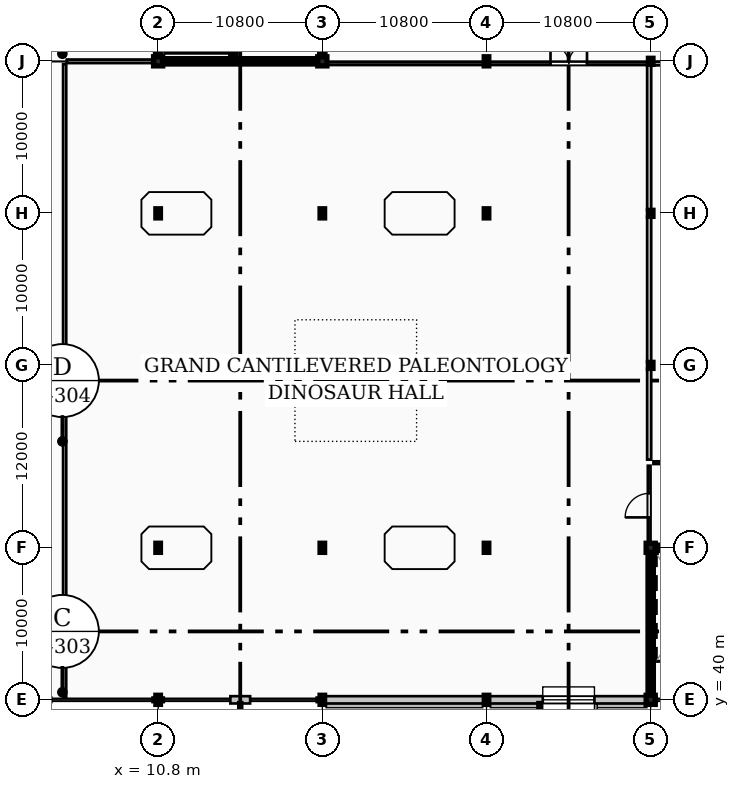
"""IFC4 building model, lengths in metres.
Left out: names, types, materials, properties, quantities, classifications, styles, units other than length and angle.
Written with IfcOpenShell. Run it as: python <this file> out.ifc"""

import sys

from ifc_helpers import new_model, si_unit, direction, frame, frame_2d, origin, origin_2d, place, context, subcontext, project, spatial, rectangle, i_section, extrude, element, fill, save


model = new_model("IFC4")
c1 = context("Model", 3, precision=1e-05, world=origin(), true_north=direction((0.0, 1.0)))
c2 = subcontext(c1, "Body", "Model", "MODEL_VIEW")
j1 = project(units=[si_unit("LENGTHUNIT", "METRE"), si_unit("PLANEANGLEUNIT", "RADIAN")], contexts=[c1])
p1 = place(None, origin())
s1 = spatial("IfcSite", under=j1, at=p1, CompositionType="ELEMENT")
p2 = place(p1, origin())
s2 = spatial("IfcBuilding", under=s1, at=p2, CompositionType="ELEMENT")
p3 = place(p2, frame((0.0, 0.0, 14.4)))
s3 = spatial("IfcBuildingStorey", under=s2, at=p3, CompositionType="ELEMENT", Elevation=14.4)
for number, where, z_axis, x_axis in (
    (1, (10.8, 40.0, 0.0), (0.0, 0.0, 1.0), (1.0, 0.0, 0.0)),
    (2, (10.8, 50.0, 0.0), (0.0, 0.0, 1.0), (1.0, 0.0, 0.0)),
    (3, (10.8, 62.0, 0.0), (0.0, 0.0, 1.0), (1.0, 0.0, 0.0)),
    (4, (10.8, 72.0, 0.0), (0.0, 0.0, 1.0), (1.0, 0.0, 0.0)),
):
    element("IfcColumn", number, at=place(p3, frame(where, z_axis=z_axis, x_axis=x_axis)), inside=s3, PredefinedType="COLUMN", context=c2, shape_type="SweptSolid", body=[
        extrude(i_section(OverallWidth=0.3, OverallDepth=0.6, WebThickness=0.015, FlangeThickness=0.03, FilletRadius=0.027, at=origin_2d()), origin(), (0.0, 0.0, 1.0), 9.6),
    ])
p4 = place(p3, frame((10.8, 82.0, 0.0), z_axis=(0.0, 0.0, 1.0), x_axis=(1.0, 0.0, 0.0)))
e5 = element("IfcColumn", 5, at=p4, inside=s3, PredefinedType="COLUMN", context=c2, shape_type="SweptSolid", body=[
    extrude(rectangle(XDim=0.6, YDim=0.6, at=origin_2d()), origin(), (0.0, 0.0, 1.0), 9.6),
])
for number, where, z_axis, x_axis in (
    (6, (21.6, 40.0, 0.0), (0.0, 0.0, 1.0), (1.0, 0.0, 0.0)),
    (7, (21.6, 50.0, 0.0), (0.0, 0.0, 1.0), (1.0, 0.0, 0.0)),
    (8, (21.6, 62.0, 0.0), (0.0, 0.0, 1.0), (1.0, 0.0, 0.0)),
    (9, (21.6, 72.0, 0.0), (0.0, 0.0, 1.0), (1.0, 0.0, 0.0)),
):
    element("IfcColumn", number, at=place(p3, frame(where, z_axis=z_axis, x_axis=x_axis)), inside=s3, PredefinedType="COLUMN", context=c2, shape_type="SweptSolid", body=[
        extrude(i_section(OverallWidth=0.3, OverallDepth=0.6, WebThickness=0.015, FlangeThickness=0.03, FilletRadius=0.027, at=origin_2d()), origin(), (0.0, 0.0, 1.0), 9.6),
    ])
p5 = place(p3, frame((21.6, 82.0, 0.0), z_axis=(0.0, 0.0, 1.0), x_axis=(1.0, 0.0, 0.0)))
e10 = element("IfcColumn", 10, at=p5, inside=s3, PredefinedType="COLUMN", context=c2, shape_type="SweptSolid", body=[
    extrude(rectangle(XDim=0.6, YDim=0.6, at=origin_2d()), origin(), (0.0, 0.0, 1.0), 9.6),
])
for number, where, z_axis, x_axis in (
    (11, (32.4, 40.0, 0.0), (0.0, 0.0, 1.0), (1.0, 0.0, 0.0)),
    (12, (32.4, 50.0, 0.0), (0.0, 0.0, 1.0), (1.0, 0.0, 0.0)),
    (13, (32.4, 62.0, 0.0), (0.0, 0.0, 1.0), (1.0, 0.0, 0.0)),
    (14, (32.4, 72.0, 0.0), (0.0, 0.0, 1.0), (1.0, 0.0, 0.0)),
    (15, (32.4, 82.0, 0.0), (0.0, 0.0, 1.0), (1.0, 0.0, 0.0)),
):
    element("IfcColumn", number, at=place(p3, frame(where, z_axis=z_axis, x_axis=x_axis)), inside=s3, PredefinedType="COLUMN", context=c2, shape_type="SweptSolid", body=[
        extrude(i_section(OverallWidth=0.3, OverallDepth=0.6, WebThickness=0.015, FlangeThickness=0.03, FilletRadius=0.027, at=origin_2d()), origin(), (0.0, 0.0, 1.0), 9.6),
    ])
for number, where, z_axis, x_axis in (
    (16, (43.2, 40.0, 0.0), (0.0, 0.0, 1.0), (1.0, 0.0, 0.0)),
    (17, (43.2, 50.0, 0.0), (0.0, 0.0, 1.0), (1.0, 0.0, 0.0)),
):
    element("IfcColumn", number, at=place(p3, frame(where, z_axis=z_axis, x_axis=x_axis)), inside=s3, PredefinedType="COLUMN", context=c2, shape_type="SweptSolid", body=[
        extrude(rectangle(XDim=0.6, YDim=0.6, at=origin_2d()), origin(), (0.0, 0.0, 1.0), 9.6),
    ])
for number, where, z_axis, x_axis in (
    (18, (43.2, 62.0, 0.0), (0.0, 0.0, 1.0), (1.0, 0.0, 0.0)),
    (19, (43.2, 72.0, 0.0), (0.0, 0.0, 1.0), (1.0, 0.0, 0.0)),
    (20, (43.2, 82.0, 0.0), (0.0, 0.0, 1.0), (1.0, 0.0, 0.0)),
):
    element("IfcColumn", number, at=place(p3, frame(where, z_axis=z_axis, x_axis=x_axis)), inside=s3, PredefinedType="COLUMN", context=c2, shape_type="SweptSolid", body=[
        extrude(i_section(OverallWidth=0.3, OverallDepth=0.4, WebThickness=0.013, FlangeThickness=0.024, FilletRadius=0.027, at=origin_2d()), origin(), (0.0, 0.0, 1.0), 9.6),
    ])
p6 = place(p3, frame((10.43, 40.0, 0.0), z_axis=(0.0, 0.0, 1.0), x_axis=(1.0, 0.0, 0.0)))
e21 = element("IfcWall", 21, at=p6, inside=s3, PredefinedType="STANDARD", context=c2, shape_type="SweptSolid", body=[
    extrude(rectangle(XDim=0.225, YDim=0.3, at=frame_2d((0.113, 0.0))), origin(), (0.0, 0.0, 1.0), 9.36),
])
p7 = place(p3, frame((15.55, 40.0, 0.0), z_axis=(0.0, 0.0, 1.0), x_axis=(1.0, 0.0, 0.0)))
e22 = element("IfcWall", 22, at=p7, inside=s3, PredefinedType="STANDARD", context=c2, shape_type="SweptSolid", body=[
    extrude(rectangle(XDim=1.3, YDim=0.48, at=frame_2d((0.65, 0.0))), origin(), (0.0, 0.0, 1.0), 8.759),
])
p8 = place(p3, frame((10.945, 40.0, 0.0), z_axis=(0.0, 0.0, 1.0), x_axis=(1.0, 0.0, 0.0)))
e23 = element("IfcWall", 23, at=p8, inside=s3, PredefinedType="STANDARD", context=c2, shape_type="SweptSolid", body=[
    extrude(rectangle(XDim=0.225, YDim=0.3, at=frame_2d((0.112, 0.0))), origin(), (0.0, 0.0, 1.0), 9.36),
])
p9 = place(p3, frame((21.23, 40.0, 0.0), z_axis=(0.0, 0.0, 1.0), x_axis=(1.0, 0.0, 0.0)))
e24 = element("IfcWall", 24, at=p9, inside=s3, PredefinedType="STANDARD", context=c2, shape_type="SweptSolid", body=[
    extrude(rectangle(XDim=0.225, YDim=0.3, at=frame_2d((0.113, 0.0))), origin(), (0.0, 0.0, 1.0), 9.36),
])
p10 = place(p3, frame((21.745, 40.0, 0.0), z_axis=(0.0, 0.0, 1.0), x_axis=(1.0, 0.0, 0.0)))
e25 = element("IfcWall", 25, at=p10, inside=s3, PredefinedType="STANDARD", context=c2, shape_type="SweptSolid", body=[
    extrude(rectangle(XDim=10.51, YDim=0.48, at=frame_2d((5.255, 0.0))), origin(), (0.0, 0.0, 1.0), 8.759),
])
p11 = place(p3, frame((32.545, 40.0, 0.0), z_axis=(0.0, 0.0, 1.0), x_axis=(1.0, 0.0, 0.0)))
e26 = element("IfcWall", 26, at=p11, inside=s3, PredefinedType="STANDARD", context=c2, shape_type="SweptSolid", body=[
    extrude(rectangle(XDim=10.51, YDim=0.48, at=frame_2d((5.255, 0.0))), origin(), (0.0, 0.0, 1.0), 9.36),
])
p12 = place(p11, frame((3.555, 0.0, 1.1)))
e27 = element("IfcOpeningElement", 27, at=p12, cuts=e26, PredefinedType="OPENING", context=c2, shape_type="SweptSolid", body=[
    extrude(rectangle(XDim=3.4, YDim=5.8, at=frame_2d((1.7, 2.9))), frame((0.0, 0.25, 0.0), z_axis=(0.0, -1.0, 0.0), x_axis=(1.0, 0.0, 0.0)), (0.0, 0.0, 1.0), 0.5),
])
p13 = place(p3, frame((43.345, 40.0, 0.0), z_axis=(0.0, 0.0, 1.0), x_axis=(1.0, 0.0, 0.0)))
e28 = element("IfcWall", 28, at=p13, inside=s3, PredefinedType="STANDARD", context=c2, shape_type="SweptSolid", body=[
    extrude(rectangle(XDim=0.225, YDim=0.3, at=frame_2d((0.113, 0.0))), origin(), (0.0, 0.0, 1.0), 9.36),
])
p14 = place(p3, frame((11.1, 82.0, 0.0), z_axis=(0.0, 0.0, 1.0), x_axis=(1.0, 0.0, 0.0)))
e29 = element("IfcWall", 29, at=p14, inside=s3, PredefinedType="SHEAR", context=c2, shape_type="SweptSolid", body=[
    extrude(rectangle(XDim=10.2, YDim=0.35, at=frame_2d((5.1, 0.0))), origin(), (0.0, 0.0, 1.0), 9.36),
])
p15 = place(p3, frame((10.8, 82.3, 0.0), z_axis=(0.0, 0.0, 1.0), x_axis=(0.0, 1.0, 0.0)))
e30 = element("IfcWall", 30, at=p15, inside=s3, PredefinedType="SHEAR", context=c2, shape_type="SweptSolid", body=[
    extrude(rectangle(XDim=9.4, YDim=0.35, at=frame_2d((4.7, 0.0))), origin(), (0.0, 0.0, 1.0), 9.36),
])
p16 = place(p3, frame((21.6, 82.3, 0.0), z_axis=(0.0, 0.0, 1.0), x_axis=(0.0, 1.0, 0.0)))
e31 = element("IfcWall", 31, at=p16, inside=s3, PredefinedType="SHEAR", context=c2, shape_type="SweptSolid", body=[
    extrude(rectangle(XDim=9.4, YDim=0.35, at=frame_2d((4.7, 0.0))), origin(), (0.0, 0.0, 1.0), 9.36),
])
p17 = place(p16, frame((0.88, 0.0, 0.0)))
e32 = element("IfcOpeningElement", 32, at=p17, cuts=e31, PredefinedType="OPENING", context=c2, shape_type="SweptSolid", body=[
    extrude(rectangle(XDim=1.8, YDim=2.25, at=frame_2d((0.9, 1.125))), frame((0.0, 0.185, 0.0), z_axis=(0.0, -1.0, 0.0), x_axis=(1.0, 0.0, 0.0)), (0.0, 0.0, 1.0), 0.37),
])
p18 = place(p3, frame((15.75, 82.175, 0.0), z_axis=(0.0, 0.0, 1.0), x_axis=(0.0, 1.0, 0.0)))
e33 = element("IfcWall", 33, at=p18, inside=s3, PredefinedType="SHEAR", context=c2, shape_type="SweptSolid", body=[
    extrude(rectangle(XDim=9.65, YDim=0.35, at=frame_2d((4.825, 0.0))), origin(), (0.0, 0.0, 1.0), 9.36),
])
p19 = place(p18, frame((0.9, 0.0, 0.0)))
e34 = element("IfcOpeningElement", 34, at=p19, cuts=e33, PredefinedType="OPENING", context=c2, shape_type="SweptSolid", body=[
    extrude(rectangle(XDim=1.1, YDim=2.2, at=frame_2d((0.55, 1.1))), frame((0.0, 0.185, 0.0), z_axis=(0.0, -1.0, 0.0), x_axis=(1.0, 0.0, 0.0)), (0.0, 0.0, 1.0), 0.37),
])
p20 = place(p3, frame((43.5, 50.0, 0.0), z_axis=(0.0, 0.0, 1.0), x_axis=(1.0, 0.0, 0.0)))
e35 = element("IfcWall", 35, at=p20, inside=s3, PredefinedType="SHEAR", context=c2, shape_type="SweptSolid", body=[
    extrude(rectangle(XDim=10.2, YDim=0.35, at=frame_2d((5.1, 0.0))), origin(), (0.0, 0.0, 1.0), 9.36),
])
p21 = place(p3, frame((43.2, 40.3, 0.0), z_axis=(0.0, 0.0, 1.0), x_axis=(0.0, 1.0, 0.0)))
e36 = element("IfcWall", 36, at=p21, inside=s3, PredefinedType="SHEAR", context=c2, shape_type="SweptSolid", body=[
    extrude(rectangle(XDim=9.4, YDim=0.35, at=frame_2d((4.7, 0.0))), origin(), (0.0, 0.0, 1.0), 9.36),
])
p22 = place(p3, frame((21.78, 81.85, 0.0), z_axis=(0.0, 0.0, 1.0), x_axis=(1.0, 0.0, 0.0)))
e37 = element("IfcWall", 37, at=p22, inside=s3, PredefinedType="PARTITIONING", context=c2, shape_type="SweptSolid", body=[
    extrude(rectangle(XDim=10.42, YDim=0.19, at=frame_2d((5.21, 0.0))), origin(), (0.0, 0.0, 1.0), 8.759),
])
p23 = place(p3, frame((32.6, 81.85, 0.0), z_axis=(0.0, 0.0, 1.0), x_axis=(1.0, 0.0, 0.0)))
e38 = element("IfcWall", 38, at=p23, inside=s3, PredefinedType="PARTITIONING", context=c2, shape_type="SweptSolid", body=[
    extrude(rectangle(XDim=10.42, YDim=0.19, at=frame_2d((5.21, 0.0))), origin(), (0.0, 0.0, 1.0), 8.96),
])
p24 = place(p23, frame((4.01, 0.0, 0.0)))
e39 = element("IfcOpeningElement", 39, at=p24, cuts=e38, PredefinedType="OPENING", context=c2, shape_type="SweptSolid", body=[
    extrude(rectangle(XDim=2.4, YDim=2.8, at=frame_2d((1.2, 1.4))), frame((0.0, 0.105, 0.0), z_axis=(0.0, -1.0, 0.0), x_axis=(1.0, 0.0, 0.0)), (0.0, 0.0, 1.0), 0.21),
])
p25 = place(p3, frame((43.38, 81.85, 0.0), z_axis=(0.0, 0.0, 1.0), x_axis=(1.0, 0.0, 0.0)))
e40 = element("IfcWall", 40, at=p25, inside=s3, PredefinedType="PARTITIONING", context=c2, shape_type="SweptSolid", body=[
    extrude(rectangle(XDim=10.44, YDim=0.23, at=frame_2d((5.22, 0.0))), origin(), (0.0, 0.0, 1.0), 8.96),
])
p26 = place(p25, frame((3.92, 0.0, 0.0)))
e41 = element("IfcOpeningElement", 41, at=p26, cuts=e40, PredefinedType="OPENING", context=c2, shape_type="SweptSolid", body=[
    extrude(rectangle(XDim=2.6, YDim=2.8, at=frame_2d((1.3, 1.4))), frame((0.0, 0.125, 0.0), z_axis=(0.0, -1.0, 0.0), x_axis=(1.0, 0.0, 0.0)), (0.0, 0.0, 1.0), 0.25),
])
p27 = place(p3, frame((43.1, 50.18, 0.0), z_axis=(0.0, 0.0, 1.0), x_axis=(0.0, 1.0, 0.0)))
e42 = element("IfcWall", 42, at=p27, inside=s3, PredefinedType="PLUMBINGWALL", context=c2, shape_type="SweptSolid", body=[
    extrude(rectangle(XDim=5.22, YDim=0.18, at=frame_2d((2.61, 0.0))), origin(), (0.0, 0.0, 1.0), 9.32),
])
p28 = place(p27, frame((1.82, 0.0, 0.0)))
e43 = element("IfcOpeningElement", 43, at=p28, cuts=e42, PredefinedType="OPENING", context=c2, shape_type="SweptSolid", body=[
    extrude(rectangle(XDim=1.58, YDim=2.48, at=frame_2d((0.79, 1.24))), frame((0.0, 0.1, 0.0), z_axis=(0.0, -1.0, 0.0), x_axis=(1.0, 0.0, 0.0)), (0.0, 0.0, 1.0), 0.2),
])
p29 = place(p3, frame((43.38, 55.6, 0.0), z_axis=(0.0, 0.0, 1.0), x_axis=(1.0, 0.0, 0.0)))
e44 = element("IfcWall", 44, at=p29, inside=s3, PredefinedType="PLUMBINGWALL", context=c2, shape_type="SweptSolid", body=[
    extrude(rectangle(XDim=4.82, YDim=0.18, at=frame_2d((2.41, 0.0))), origin(), (0.0, 0.0, 1.0), 9.32),
])
p30 = place(p3, frame((4.8, 82.0, 0.0), z_axis=(0.0, 0.0, 1.0), x_axis=(1.0, 0.0, 0.0)))
e45 = element("IfcWall", 45, at=p30, inside=s3, PredefinedType="PARTITIONING", context=c2, shape_type="SweptSolid", body=[
    extrude(rectangle(XDim=5.82, YDim=0.21, at=frame_2d((2.91, 0.0))), origin(), (0.0, 0.0, 1.0), 4.054),
])
p31 = place(p3, frame((43.1, 55.8, 0.0), z_axis=(0.0, 0.0, 1.0), x_axis=(0.0, 1.0, 0.0)))
e46 = element("IfcWall", 46, at=p31, inside=s3, PredefinedType="PARTITIONING", context=c2, shape_type="SweptSolid", body=[
    extrude(rectangle(XDim=6.0, YDim=0.27, at=frame_2d((3.0, 0.0))), origin(), (0.0, 0.0, 1.0), 9.32),
])
p32 = place(p3, frame((43.1, 62.2, 0.0), z_axis=(0.0, 0.0, 1.0), x_axis=(0.0, 1.0, 0.0)))
e47 = element("IfcWall", 47, at=p32, inside=s3, PredefinedType="PARTITIONING", context=c2, shape_type="SweptSolid", body=[
    extrude(rectangle(XDim=9.6, YDim=0.27, at=frame_2d((4.8, 0.0))), origin(), (0.0, 0.0, 1.0), 9.32),
])
p33 = place(p3, frame((43.1, 72.2, 0.0), z_axis=(0.0, 0.0, 1.0), x_axis=(0.0, 1.0, 0.0)))
e48 = element("IfcWall", 48, at=p33, inside=s3, PredefinedType="PARTITIONING", context=c2, shape_type="SweptSolid", body=[
    extrude(rectangle(XDim=9.62, YDim=0.27, at=frame_2d((4.81, 0.0))), origin(), (0.0, 0.0, 1.0), 9.32),
])
p34 = place(p3, frame((4.65, 40.18, 0.0), z_axis=(0.0, 0.0, 1.0), x_axis=(0.0, 1.0, 0.0)))
e49 = element("IfcWall", 49, at=p34, inside=s3, PredefinedType="PARTITIONING", context=c2, shape_type="SweptSolid", body=[
    extrude(rectangle(XDim=41.64, YDim=0.21, at=frame_2d((20.82, 0.0))), origin(), (0.0, 0.0, 1.0), 9.32),
])
p35 = place(p3, frame((4.8, 82.0, 4.445), z_axis=(0.0, 0.0, 1.0), x_axis=(1.0, 0.0, 0.0)))
e50 = element("IfcWall", 50, at=p35, inside=s3, PredefinedType="PARTITIONING", context=c2, shape_type="SweptSolid", body=[
    extrude(rectangle(XDim=5.82, YDim=0.21, at=frame_2d((2.91, 0.0))), origin(), (0.0, 0.0, 1.0), 4.314),
])
p36 = place(p12, origin())
e51 = element("IfcWindow", 51, at=p36, inside=s3, PartitioningType="SINGLE_PANEL", PredefinedType="WINDOW", context=c2, shape_type="SweptSolid", body=[
    extrude(rectangle(XDim=3.4, YDim=5.8, at=frame_2d((1.7, 2.9))), frame((0.0, 0.03, 0.0), z_axis=(0.0, -1.0, 0.0), x_axis=(1.0, 0.0, 0.0)), (0.0, 0.0, 1.0), 0.06),
])
fill(e27, e51)
p37 = place(p24, origin())
e52 = element("IfcDoor", 52, at=p37, inside=s3, OperationType="DOUBLE_DOOR_SINGLE_SWING", PredefinedType="DOOR", context=c2, shape_type="SweptSolid", body=[
    extrude(rectangle(XDim=2.4, YDim=2.8, at=frame_2d((1.2, 1.4))), frame((0.0, 0.025, 0.0), z_axis=(0.0, -1.0, 0.0), x_axis=(1.0, 0.0, 0.0)), (0.0, 0.0, 1.0), 0.05),
])
fill(e39, e52)
p38 = place(p28, origin())
e53 = element("IfcDoor", 53, at=p38, inside=s3, OperationType="SINGLE_SWING_LEFT", PredefinedType="DOOR", context=c2, shape_type="SweptSolid", body=[
    extrude(rectangle(XDim=1.58, YDim=2.48, at=frame_2d((0.79, 1.24))), frame((0.0, 0.025, 0.0), z_axis=(0.0, -1.0, 0.0), x_axis=(1.0, 0.0, 0.0)), (0.0, 0.0, 1.0), 0.05),
])
fill(e43, e53)
save(model, sys.argv[1])
